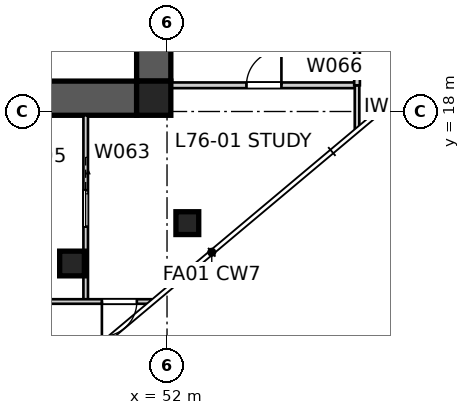
"""IFC4 building model, lengths in metres.
Left out: names, types, materials, properties, quantities, classifications, styles, units other than length and angle.
Written with IfcOpenShell. Run it as: python <this file> out.ifc"""

import sys

from ifc_helpers import new_model, si_unit, direction, frame, frame_2d, origin, origin_2d, place, context, subcontext, project, spatial, polyline, rectangle, outline, extrude, element, fill, save


model = new_model("IFC4")
c1 = context("Model", 3, precision=1e-05, world=origin(), true_north=direction((0.0, 1.0)))
c2 = subcontext(c1, "Body", "Model", "MODEL_VIEW")
j1 = project(units=[si_unit("LENGTHUNIT", "METRE"), si_unit("PLANEANGLEUNIT", "RADIAN")], contexts=[c1])
p1 = place(None, origin())
s1 = spatial("IfcSite", under=j1, at=p1, CompositionType="ELEMENT")
p2 = place(p1, origin())
s2 = spatial("IfcBuilding", under=s1, at=p2, CompositionType="ELEMENT")
p3 = place(p2, frame((0.0, 0.0, 276.0)))
s3 = spatial("IfcBuildingStorey", under=s2, at=p3, CompositionType="ELEMENT", Elevation=276.0)
p4 = place(p3, frame((51.2, 18.35, 0.0), z_axis=(0.0, 0.0, 1.0), x_axis=(-1.0, 0.0, 0.0)))
e1 = element("IfcWall", 1, at=p4, inside=s3, PredefinedType="SHEAR", context=c2, shape_type="SweptSolid", body=[
    extrude(outline(polyline([(0.0, -0.45), (22.4, -0.45), (22.4, -0.025), (22.85, -0.025), (22.85, 0.025), (22.4, 0.025), (22.4, 0.45), (0.0, 0.45), (0.0, 0.025), (-0.45, 0.025), (-0.45, -0.025), (0.0, -0.025), (0.0, -0.45)])), origin(), (0.0, 0.0, 1.0), 3.4),
])
p5 = place(p3, frame((51.65, 18.8, 0.0), z_axis=(0.0, 0.0, 1.0), x_axis=(0.0, 1.0, 0.0)))
e2 = element("IfcWall", 2, at=p5, inside=s3, PredefinedType="SHEAR", context=c2, shape_type="SweptSolid", body=[
    extrude(outline(polyline([(0.0, -0.45), (22.4, -0.45), (22.4, -0.025), (22.85, -0.025), (22.85, 0.025), (22.4, 0.025), (22.4, 0.45), (0.0, 0.45), (0.0, 0.025), (-0.45, 0.025), (-0.45, -0.025), (0.0, -0.025), (0.0, -0.45)])), origin(), (0.0, 0.0, 1.0), 3.4),
])
p6 = place(p5, frame((11.14, 0.0, 0.0)))
e3 = element("IfcOpeningElement", 3, at=p6, cuts=e2, PredefinedType="OPENING", context=c2, shape_type="SweptSolid", body=[
    extrude(rectangle(XDim=1.02, YDim=2.4, at=frame_2d((0.51, 1.2))), frame((0.0, 0.46, 0.0), z_axis=(0.0, -1.0, 0.0), x_axis=(1.0, 0.0, 0.0)), (0.0, 0.0, 1.0), 0.92),
])
p7 = place(p3, frame((51.65, 18.35, 0.0), z_axis=(0.0, 0.0, 1.0), x_axis=(1.0, 0.0, 0.0)))
e4 = element("IfcColumn", 4, at=p7, inside=s3, PredefinedType="COLUMN", context=c2, shape_type="SweptSolid", body=[
    extrude(rectangle(XDim=0.9, YDim=0.9, at=origin_2d()), origin(), (0.0, 0.0, 1.0), 3.4),
])
p8 = place(p3, frame((52.534, 15.062, 0.0), z_axis=(0.0, 0.0, 1.0), x_axis=(1.0, 0.0, 0.0)))
e5 = element("IfcColumn", 5, at=p8, inside=s3, PredefinedType="COLUMN", context=c2, shape_type="SweptSolid", body=[
    extrude(rectangle(XDim=0.6, YDim=0.6, at=origin_2d()), origin(), (0.0, 0.0, 1.0), 3.4),
])
p9 = place(p3, frame((49.5, 14.0, 0.0), z_axis=(0.0, 0.0, 1.0), x_axis=(1.0, 0.0, 0.0)))
e6 = element("IfcColumn", 6, at=p9, inside=s3, PredefinedType="COLUMN", context=c2, shape_type="SweptSolid", body=[
    extrude(rectangle(XDim=0.65, YDim=0.65, at=origin_2d()), origin(), (0.0, 0.0, 1.0), 3.4),
])
p10 = place(p3, frame((49.86, 17.9, 0.0), z_axis=(0.0, 0.0, 1.0), x_axis=(0.0, -1.0, 0.0)))
e7 = element("IfcWall", 7, at=p10, inside=s3, PredefinedType="PARTITIONING", context=c2, shape_type="SweptSolid", body=[
    extrude(rectangle(XDim=4.9, YDim=0.12, at=frame_2d((2.45, 0.0))), origin(), (0.0, 0.0, 1.0), 3.25),
])
p11 = place(p10, frame((1.97, 0.0, 0.0)))
e8 = element("IfcOpeningElement", 8, at=p11, cuts=e7, PredefinedType="OPENING", context=c2, shape_type="SweptSolid", body=[
    extrude(rectangle(XDim=0.96, YDim=2.1, at=frame_2d((0.48, 1.05))), frame((0.0, 0.07, 0.0), z_axis=(0.0, -1.0, 0.0), x_axis=(1.0, 0.0, 0.0)), (0.0, 0.0, 1.0), 0.14),
])
p12 = place(p3, frame((51.57, 13.0, 0.0), z_axis=(0.0, 0.0, 1.0), x_axis=(-1.0, 0.0, 0.0)))
e9 = element("IfcWall", 9, at=p12, inside=s3, PredefinedType="PARTITIONING", context=c2, shape_type="SweptSolid", body=[
    extrude(rectangle(XDim=6.652, YDim=0.12, at=frame_2d((3.326, 0.0))), origin(), (0.0, 0.0, 1.0), 2.549),
])
p13 = place(p12, frame((0.364, 0.0, 0.0)))
e10 = element("IfcOpeningElement", 10, at=p13, cuts=e9, PredefinedType="OPENING", context=c2, shape_type="SweptSolid", body=[
    extrude(rectangle(XDim=0.92, YDim=2.34, at=frame_2d((0.46, 1.17))), frame((0.0, 0.07, 0.0), z_axis=(0.0, -1.0, 0.0), x_axis=(1.0, 0.0, 0.0)), (0.0, 0.0, 1.0), 0.14),
])
p14 = place(p3, frame((51.18, 18.689, 0.0), z_axis=(0.0, 0.0, 1.0), x_axis=(1.0, 0.0, 0.0)))
e11 = element("IfcWall", 11, at=p14, inside=s3, PredefinedType="SOLIDWALL", context=c2, shape_type="SweptSolid", body=[
    extrude(rectangle(XDim=5.82, YDim=0.15, at=frame_2d((2.91, 0.0))), origin(), (0.0, 0.0, 1.0), 3.25),
])
p15 = place(p14, frame((2.91, 0.0, 0.0)))
e12 = element("IfcOpeningElement", 12, at=p15, cuts=e11, PredefinedType="OPENING", context=c2, shape_type="SweptSolid", body=[
    extrude(rectangle(XDim=0.92, YDim=2.1, at=frame_2d((0.46, 1.05))), frame((0.0, 0.085, 0.0), z_axis=(0.0, -1.0, 0.0), x_axis=(1.0, 0.0, 0.0)), (0.0, 0.0, 1.0), 0.17),
])
p16 = place(p3, frame((57.0, 18.689, 0.0), z_axis=(0.0, 0.0, 1.0), x_axis=(0.0, -1.0, 0.0)))
e13 = element("IfcWall", 13, at=p16, inside=s3, PredefinedType="PARTITIONING", context=c2, shape_type="SweptSolid", body=[
    extrude(rectangle(XDim=1.133, YDim=0.12, at=frame_2d((0.567, 0.0))), origin(), (0.0, 0.0, 1.0), 3.25),
])
p17 = place(p3, frame((57.0, 23.81, 0.0), z_axis=(0.0, 0.0, 1.0), x_axis=(0.0, -1.0, 0.0)))
e14 = element("IfcWall", 14, at=p17, inside=s3, PredefinedType="SOLIDWALL", context=c2, shape_type="SweptSolid", body=[
    extrude(rectangle(XDim=5.121, YDim=0.15, at=frame_2d((2.56, 0.0))), origin(), (0.0, 0.0, 1.0), 3.25),
])
p18 = place(p15, origin())
e15 = element("IfcDoor", 15, at=p18, inside=s3, OperationType="SINGLE_SWING_RIGHT", PredefinedType="DOOR", context=c2, shape_type="SweptSolid", body=[
    extrude(rectangle(XDim=0.92, YDim=2.1, at=frame_2d((0.46, 1.05))), frame((0.0, 0.025, 0.0), z_axis=(0.0, -1.0, 0.0), x_axis=(1.0, 0.0, 0.0)), (0.0, 0.0, 1.0), 0.05),
])
fill(e12, e15)
p19 = place(p11, origin())
e16 = element("IfcDoor", 16, at=p19, inside=s3, OperationType="SLIDING_TO_LEFT", PredefinedType="DOOR", context=c2, shape_type="SweptSolid", body=[
    extrude(rectangle(XDim=0.96, YDim=2.1, at=frame_2d((0.48, 1.05))), frame((0.0, 0.025, 0.0), z_axis=(0.0, -1.0, 0.0), x_axis=(1.0, 0.0, 0.0)), (0.0, 0.0, 1.0), 0.05),
])
fill(e8, e16)
p20 = place(p13, origin())
e17 = element("IfcDoor", 17, at=p20, inside=s3, OperationType="SINGLE_SWING_RIGHT", PredefinedType="DOOR", context=c2, shape_type="SweptSolid", body=[
    extrude(rectangle(XDim=0.92, YDim=2.34, at=frame_2d((0.46, 1.17))), frame((0.0, 0.025, 0.0), z_axis=(0.0, -1.0, 0.0), x_axis=(1.0, 0.0, 0.0)), (0.0, 0.0, 1.0), 0.05),
])
fill(e10, e17)
save(model, sys.argv[1])
